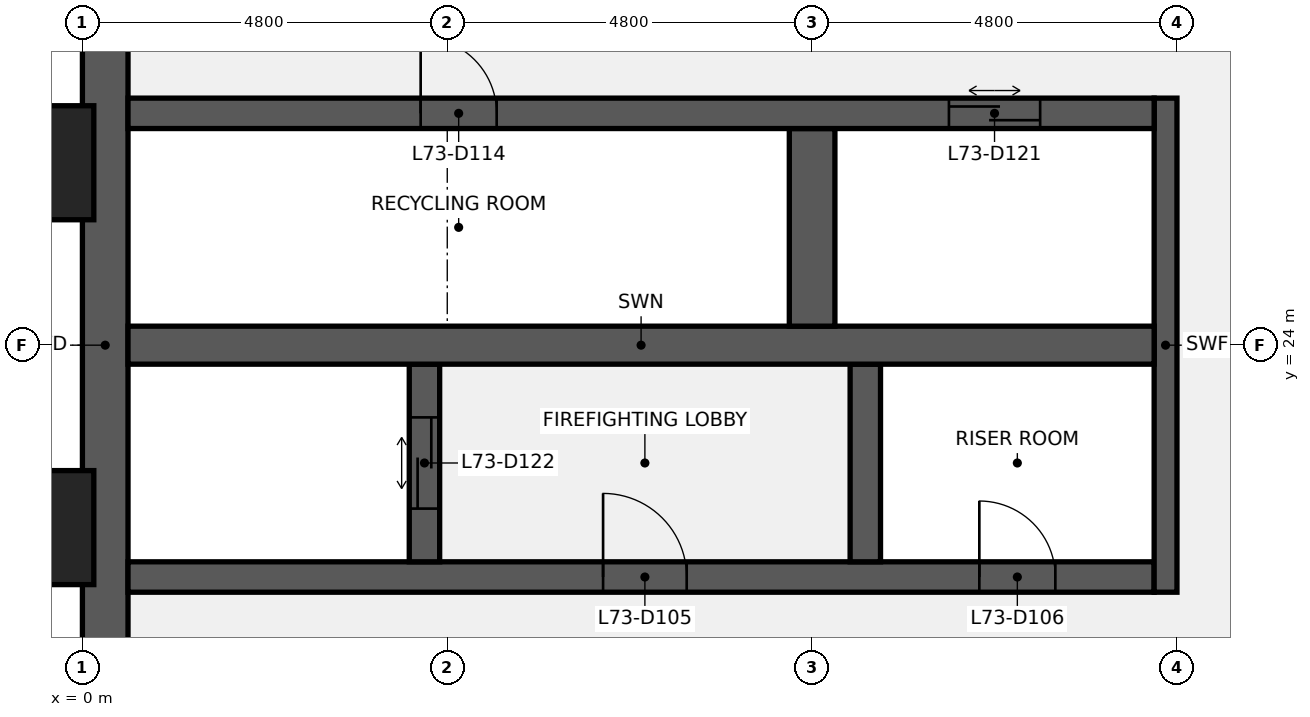
"""IFC4 building model, lengths in metres.
Left out: names, types, materials, properties, quantities, classifications, styles, units other than length and angle.
Written with IfcOpenShell. Run it as: python <this file> out.ifc"""

import sys

from ifc_helpers import new_model, si_unit, direction, frame, frame_2d, origin, origin_2d, place, context, subcontext, project, spatial, rectangle, extrude, element, fill, save


model = new_model("IFC4")
c1 = context("Model", 3, precision=1e-05, world=origin(), true_north=direction((0.0, 1.0)))
c2 = subcontext(c1, "Body", "Model", "MODEL_VIEW")
j1 = project(units=[si_unit("LENGTHUNIT", "METRE"), si_unit("PLANEANGLEUNIT", "RADIAN")], contexts=[c1])
p1 = place(None, origin())
s1 = spatial("IfcSite", under=j1, at=p1, CompositionType="ELEMENT")
p2 = place(p1, origin())
s2 = spatial("IfcBuilding", under=s1, at=p2, CompositionType="ELEMENT")
p3 = place(p2, frame((0.0, 0.0, 330.3)))
s3 = spatial("IfcBuildingStorey", under=s2, at=p3, CompositionType="ELEMENT", Elevation=330.3)
p4 = place(p3, frame((0.3, 9.6, 0.0), z_axis=(0.0, 0.0, 1.0), x_axis=(0.0, 1.0, 0.0)))
e1 = element("IfcWall", 1, at=p4, inside=s3, PredefinedType="SHEAR", context=c2, shape_type="SweptSolid", body=[
    extrude(rectangle(XDim=28.8, YDim=0.6, at=frame_2d((14.4, 0.0))), origin(), (0.0, 0.0, 1.0), 3.84),
])
p5 = place(p4, frame((8.85, 0.0, 0.9)))
e2 = element("IfcOpeningElement", 2, at=p5, cuts=e1, PredefinedType="OPENING", context=c2, shape_type="SweptSolid", body=[
    extrude(rectangle(XDim=1.5, YDim=1.5, at=frame_2d((0.75, 0.75))), frame((0.0, 0.31, 0.0), z_axis=(0.0, -1.0, 0.0), x_axis=(1.0, 0.0, 0.0)), (0.0, 0.0, 1.0), 0.62),
])
p6 = place(p4, frame((18.45, 0.0, 0.9)))
e3 = element("IfcOpeningElement", 3, at=p6, cuts=e1, PredefinedType="OPENING", context=c2, shape_type="SweptSolid", body=[
    extrude(rectangle(XDim=1.5, YDim=1.5, at=frame_2d((0.75, 0.75))), frame((0.0, 0.31, 0.0), z_axis=(0.0, -1.0, 0.0), x_axis=(1.0, 0.0, 0.0)), (0.0, 0.0, 1.0), 0.62),
])
p7 = place(p3, frame((0.6, 20.95, 0.0), z_axis=(0.0, 0.0, 1.0), x_axis=(1.0, 0.0, 0.0)))
e4 = element("IfcWall", 4, at=p7, inside=s3, PredefinedType="SHEAR", context=c2, shape_type="SweptSolid", body=[
    extrude(rectangle(XDim=13.5, YDim=0.4, at=frame_2d((6.75, 0.0))), origin(), (0.0, 0.0, 1.0), 3.84),
])
p8 = place(p7, frame((6.25, 0.0, 0.0)))
e5 = element("IfcOpeningElement", 5, at=p8, cuts=e4, PredefinedType="OPENING", context=c2, shape_type="SweptSolid", body=[
    extrude(rectangle(XDim=1.1, YDim=2.1, at=frame_2d((0.55, 1.05))), frame((0.0, 0.21, 0.0), z_axis=(0.0, -1.0, 0.0), x_axis=(1.0, 0.0, 0.0)), (0.0, 0.0, 1.0), 0.42),
])
p9 = place(p7, frame((11.2, 0.0, 0.0)))
e6 = element("IfcOpeningElement", 6, at=p9, cuts=e4, PredefinedType="OPENING", context=c2, shape_type="SweptSolid", body=[
    extrude(rectangle(XDim=1.0, YDim=2.1, at=frame_2d((0.5, 1.05))), frame((0.0, 0.21, 0.0), z_axis=(0.0, -1.0, 0.0), x_axis=(1.0, 0.0, 0.0)), (0.0, 0.0, 1.0), 0.42),
])
p10 = place(p3, frame((14.25, 20.75, 0.0), z_axis=(0.0, 0.0, 1.0), x_axis=(0.0, 1.0, 0.0)))
e7 = element("IfcWall", 7, at=p10, inside=s3, PredefinedType="SHEAR", context=c2, shape_type="SweptSolid", body=[
    extrude(rectangle(XDim=6.5, YDim=0.3, at=frame_2d((3.25, 0.0))), origin(), (0.0, 0.0, 1.0), 3.84),
])
p11 = place(p3, frame((4.5, 21.15, 0.0), z_axis=(0.0, 0.0, 1.0), x_axis=(0.0, 1.0, 0.0)))
e8 = element("IfcWall", 8, at=p11, inside=s3, PredefinedType="SHEAR", context=c2, shape_type="SweptSolid", body=[
    extrude(rectangle(XDim=2.6, YDim=0.4, at=frame_2d((1.3, 0.0))), origin(), (0.0, 0.0, 1.0), 3.84),
])
p12 = place(p11, frame((0.7, 0.0, 0.0)))
e9 = element("IfcOpeningElement", 9, at=p12, cuts=e8, PredefinedType="OPENING", context=c2, shape_type="SweptSolid", body=[
    extrude(rectangle(XDim=1.2, YDim=2.1, at=frame_2d((0.6, 1.05))), frame((0.0, 0.21, 0.0), z_axis=(0.0, -1.0, 0.0), x_axis=(1.0, 0.0, 0.0)), (0.0, 0.0, 1.0), 0.42),
])
p13 = place(p3, frame((10.3, 21.15, 0.0), z_axis=(0.0, 0.0, 1.0), x_axis=(0.0, 1.0, 0.0)))
e10 = element("IfcWall", 10, at=p13, inside=s3, PredefinedType="SHEAR", context=c2, shape_type="SweptSolid", body=[
    extrude(rectangle(XDim=2.6, YDim=0.4, at=frame_2d((1.3, 0.0))), origin(), (0.0, 0.0, 1.0), 3.84),
])
p14 = place(p3, frame((0.6, 24.0, 0.0), z_axis=(0.0, 0.0, 1.0), x_axis=(1.0, 0.0, 0.0)))
e11 = element("IfcWall", 11, at=p14, inside=s3, PredefinedType="SHEAR", context=c2, shape_type="SweptSolid", body=[
    extrude(rectangle(XDim=13.5, YDim=0.5, at=frame_2d((6.75, 0.0))), origin(), (0.0, 0.0, 1.0), 3.84),
])
p15 = place(p3, frame((9.6, 24.25, 0.0), z_axis=(0.0, 0.0, 1.0), x_axis=(0.0, 1.0, 0.0)))
e12 = element("IfcWall", 12, at=p15, inside=s3, PredefinedType="SHEAR", context=c2, shape_type="SweptSolid", body=[
    extrude(rectangle(XDim=2.6, YDim=0.6, at=frame_2d((1.3, 0.0))), origin(), (0.0, 0.0, 1.0), 3.84),
])
p16 = place(p3, frame((0.6, 27.05, 0.0), z_axis=(0.0, 0.0, 1.0), x_axis=(1.0, 0.0, 0.0)))
e13 = element("IfcWall", 13, at=p16, inside=s3, PredefinedType="SHEAR", context=c2, shape_type="SweptSolid", body=[
    extrude(rectangle(XDim=13.5, YDim=0.4, at=frame_2d((6.75, 0.0))), origin(), (0.0, 0.0, 1.0), 3.84),
])
p17 = place(p16, frame((3.85, 0.0, 0.0)))
e14 = element("IfcOpeningElement", 14, at=p17, cuts=e13, PredefinedType="OPENING", context=c2, shape_type="SweptSolid", body=[
    extrude(rectangle(XDim=1.0, YDim=2.1, at=frame_2d((0.5, 1.05))), frame((0.0, 0.21, 0.0), z_axis=(0.0, -1.0, 0.0), x_axis=(1.0, 0.0, 0.0)), (0.0, 0.0, 1.0), 0.42),
])
p18 = place(p16, frame((10.8, 0.0, 0.0)))
e15 = element("IfcOpeningElement", 15, at=p18, cuts=e13, PredefinedType="OPENING", context=c2, shape_type="SweptSolid", body=[
    extrude(rectangle(XDim=1.2, YDim=2.1, at=frame_2d((0.6, 1.05))), frame((0.0, 0.21, 0.0), z_axis=(0.0, -1.0, 0.0), x_axis=(1.0, 0.0, 0.0)), (0.0, 0.0, 1.0), 0.42),
])
for number, where, z_axis, x_axis in (
    (16, (-0.75, 21.6, 0.0), (0.0, 0.0, 1.0), (0.0, 1.0, 0.0)),
    (17, (-0.75, 26.4, 0.0), (0.0, 0.0, 1.0), (0.0, 1.0, 0.0)),
):
    element("IfcColumn", number, at=place(p3, frame(where, z_axis=z_axis, x_axis=x_axis)), inside=s3, PredefinedType="PILASTER", context=c2, shape_type="SweptSolid", body=[
        extrude(rectangle(XDim=1.8, YDim=1.5, at=origin_2d()), origin(), (0.0, 0.0, 1.0), 4.0),
    ])
p19 = place(p8, origin())
e18 = element("IfcDoor", 18, at=p19, inside=s3, OperationType="SINGLE_SWING_LEFT", PredefinedType="DOOR", context=c2, shape_type="SweptSolid", body=[
    extrude(rectangle(XDim=1.1, YDim=2.1, at=frame_2d((0.55, 1.05))), frame((0.0, 0.025, 0.0), z_axis=(0.0, -1.0, 0.0), x_axis=(1.0, 0.0, 0.0)), (0.0, 0.0, 1.0), 0.05),
])
fill(e5, e18)
p20 = place(p9, origin())
e19 = element("IfcDoor", 19, at=p20, inside=s3, OperationType="SINGLE_SWING_LEFT", PredefinedType="DOOR", context=c2, shape_type="SweptSolid", body=[
    extrude(rectangle(XDim=1.0, YDim=2.1, at=frame_2d((0.5, 1.05))), frame((0.0, 0.025, 0.0), z_axis=(0.0, -1.0, 0.0), x_axis=(1.0, 0.0, 0.0)), (0.0, 0.0, 1.0), 0.05),
])
fill(e6, e19)
p21 = place(p17, origin())
e20 = element("IfcDoor", 20, at=p21, inside=s3, OperationType="SINGLE_SWING_LEFT", PredefinedType="DOOR", context=c2, shape_type="SweptSolid", body=[
    extrude(rectangle(XDim=1.0, YDim=2.1, at=frame_2d((0.5, 1.05))), frame((0.0, 0.025, 0.0), z_axis=(0.0, -1.0, 0.0), x_axis=(1.0, 0.0, 0.0)), (0.0, 0.0, 1.0), 0.05),
])
fill(e14, e20)
p22 = place(p18, origin())
e21 = element("IfcDoor", 21, at=p22, inside=s3, OperationType="DOUBLE_DOOR_SLIDING", PredefinedType="DOOR", context=c2, shape_type="SweptSolid", body=[
    extrude(rectangle(XDim=1.2, YDim=2.1, at=frame_2d((0.6, 1.05))), frame((0.0, 0.025, 0.0), z_axis=(0.0, -1.0, 0.0), x_axis=(1.0, 0.0, 0.0)), (0.0, 0.0, 1.0), 0.05),
])
fill(e15, e21)
p23 = place(p12, origin())
e22 = element("IfcDoor", 22, at=p23, inside=s3, OperationType="DOUBLE_DOOR_SLIDING", PredefinedType="DOOR", context=c2, shape_type="SweptSolid", body=[
    extrude(rectangle(XDim=1.2, YDim=2.1, at=frame_2d((0.6, 1.05))), frame((0.0, 0.025, 0.0), z_axis=(0.0, -1.0, 0.0), x_axis=(1.0, 0.0, 0.0)), (0.0, 0.0, 1.0), 0.05),
])
fill(e9, e22)
save(model, sys.argv[1])
